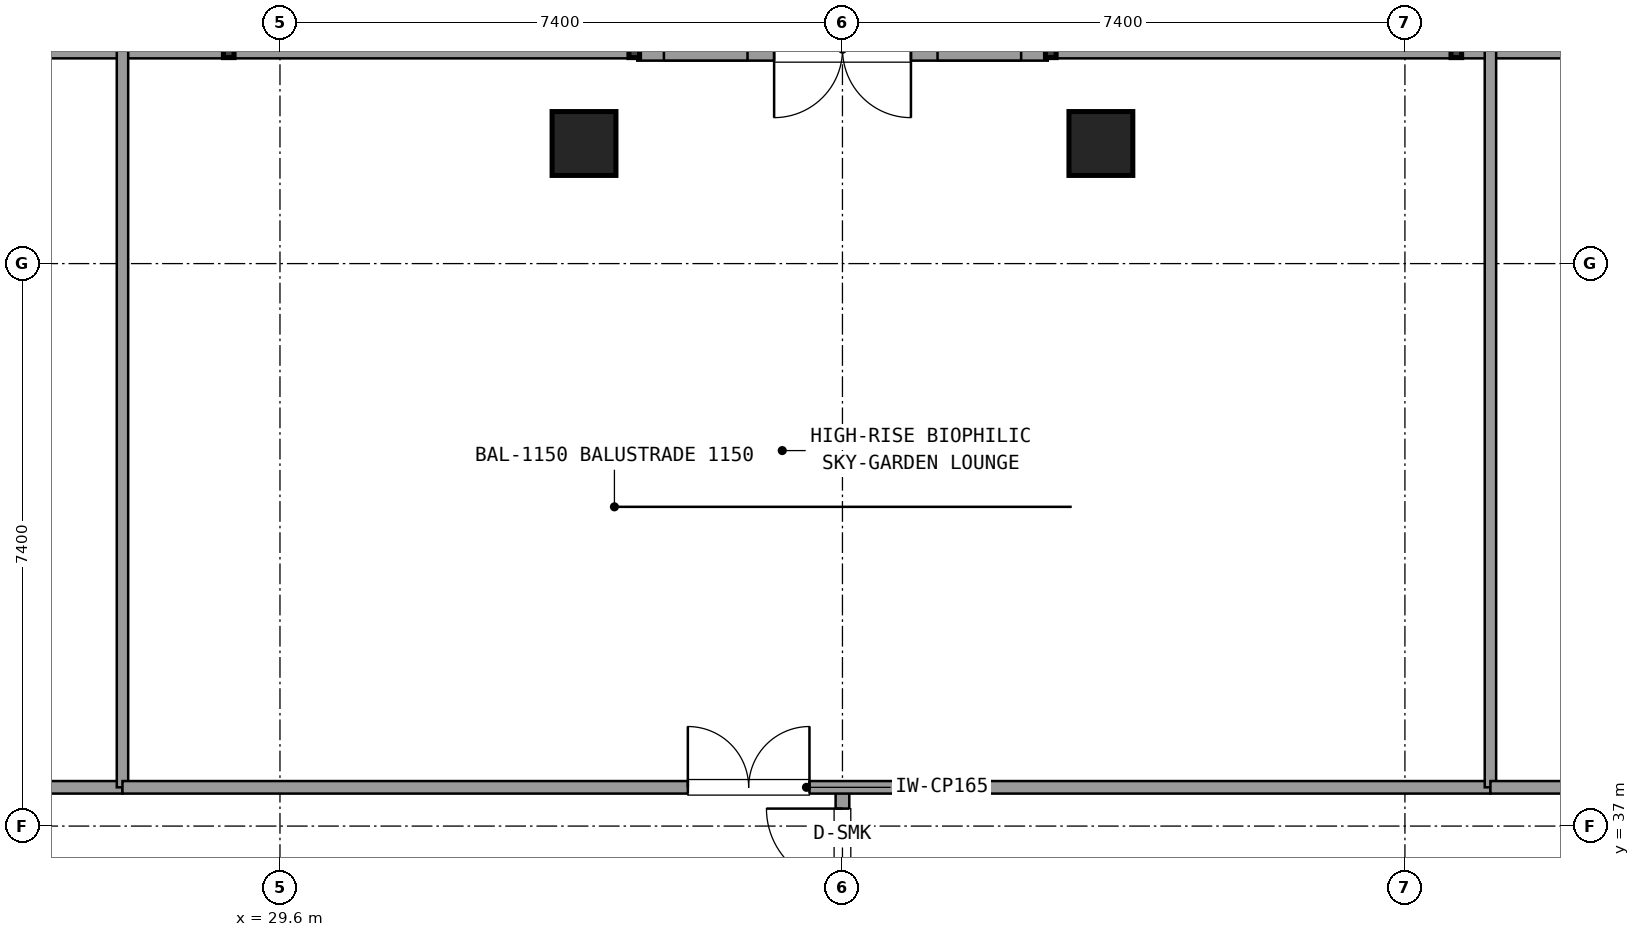
"""IFC4 building model, lengths in metres.
Left out: names, types, materials, properties, quantities, classifications, styles, units other than length and angle.
Written with IfcOpenShell. Run it as: python <this file> out.ifc"""

import sys

from ifc_helpers import new_model, si_unit, direction, frame, frame_2d, origin, origin_2d, place, context, subcontext, project, spatial, rectangle, extrude, element, fill, save


model = new_model("IFC4")
c1 = context("Model", 3, precision=1e-05, world=origin(), true_north=direction((0.0, 1.0)))
c2 = subcontext(c1, "Body", "Model", "MODEL_VIEW")
j1 = project(units=[si_unit("LENGTHUNIT", "METRE"), si_unit("PLANEANGLEUNIT", "RADIAN")], contexts=[c1])
p1 = place(None, origin())
s1 = spatial("IfcSite", under=j1, at=p1, CompositionType="ELEMENT")
p2 = place(p1, origin())
s2 = spatial("IfcBuilding", under=s1, at=p2, CompositionType="ELEMENT")
p3 = place(p2, frame((0.0, 0.0, 237.06)))
s3 = spatial("IfcBuildingStorey", under=s2, at=p3, CompositionType="ELEMENT", Elevation=237.06)
for number, where, z_axis, x_axis in (
    (1, (40.4, 45.98, 0.0), (0.0, 0.0, 1.0), (1.0, 0.0, 0.0)),
    (2, (33.6, 45.98, 0.0), (0.0, 0.0, 1.0), (1.0, 0.0, 0.0)),
):
    element("IfcColumn", number, at=place(p3, frame(where, z_axis=z_axis, x_axis=x_axis)), inside=s3, PredefinedType="COLUMN", context=c2, shape_type="SweptSolid", body=[
        extrude(rectangle(XDim=0.84, YDim=0.84, at=origin_2d()), origin(), (0.0, 0.0, 1.0), 5.76),
    ])
p4 = place(p3, frame((39.701, 47.22, 0.0), z_axis=(0.0, 0.0, 1.0), x_axis=(-1.0, 0.0, 0.0)))
e3 = element("IfcWall", 3, at=p4, inside=s3, PredefinedType="SOLIDWALL", context=c2, shape_type="SweptSolid", body=[
    extrude(rectangle(XDim=5.4, YDim=0.3, at=frame_2d((2.7, 0.0))), origin(), (0.0, 0.0, 1.0), 4.85),
])
p5 = place(p4, frame((1.8, 0.0, 0.0)))
e4 = element("IfcOpeningElement", 4, at=p5, cuts=e3, PredefinedType="OPENING", context=c2, shape_type="SweptSolid", body=[
    extrude(rectangle(XDim=1.8, YDim=2.25, at=frame_2d((0.9, 1.125))), frame((0.0, 0.16, 0.0), z_axis=(0.0, -1.0, 0.0), x_axis=(1.0, 0.0, 0.0)), (0.0, 0.0, 1.0), 0.32),
])
p6 = place(p4, frame((0.35, 0.0, 0.4)))
e5 = element("IfcOpeningElement", 5, at=p6, cuts=e3, PredefinedType="OPENING", context=c2, shape_type="SweptSolid", body=[
    extrude(rectangle(XDim=1.1, YDim=1.8, at=frame_2d((0.55, 0.9))), frame((0.0, 0.16, 0.0), z_axis=(0.0, -1.0, 0.0), x_axis=(1.0, 0.0, 0.0)), (0.0, 0.0, 1.0), 0.32),
])
p7 = place(p4, frame((3.95, 0.0, 0.4)))
e6 = element("IfcOpeningElement", 6, at=p7, cuts=e3, PredefinedType="OPENING", context=c2, shape_type="SweptSolid", body=[
    extrude(rectangle(XDim=1.1, YDim=1.8, at=frame_2d((0.55, 0.9))), frame((0.0, 0.16, 0.0), z_axis=(0.0, -1.0, 0.0), x_axis=(1.0, 0.0, 0.0)), (0.0, 0.0, 1.0), 0.32),
])
p8 = place(p3, frame((55.745, 47.22, 0.0), z_axis=(0.0, 0.0, 1.0), x_axis=(-1.0, 0.0, 0.0)))
e7 = element("IfcWall", 7, at=p8, inside=s3, PredefinedType="SOLIDWALL", context=c2, shape_type="SweptSolid", body=[
    extrude(rectangle(XDim=16.004, YDim=0.24, at=frame_2d((8.002, 0.0))), origin(), (0.0, 0.0, 1.0), 0.85),
])
p9 = place(p3, frame((34.261, 47.22, 0.0), z_axis=(0.0, 0.0, 1.0), x_axis=(-1.0, 0.0, 0.0)))
e8 = element("IfcWall", 8, at=p9, inside=s3, PredefinedType="SOLIDWALL", context=c2, shape_type="SweptSolid", body=[
    extrude(rectangle(XDim=16.006, YDim=0.24, at=frame_2d((8.003, 0.0))), origin(), (0.0, 0.0, 1.0), 0.85),
])
p10 = place(p3, frame((37.0, 34.95, 0.0), z_axis=(0.0, 0.0, 1.0), x_axis=(0.0, 1.0, 0.0)))
e9 = element("IfcWall", 9, at=p10, inside=s3, PredefinedType="PARTITIONING", context=c2, shape_type="SweptSolid", body=[
    extrude(rectangle(XDim=2.56, YDim=0.18, at=frame_2d((1.28, 0.0))), origin(), (0.0, 0.0, 1.0), 4.77),
])
p11 = place(p10, frame((0.28, 0.0, 0.0)))
e10 = element("IfcOpeningElement", 10, at=p11, cuts=e9, PredefinedType="OPENING", context=c2, shape_type="SweptSolid", body=[
    extrude(rectangle(XDim=2.0, YDim=2.2, at=frame_2d((1.0, 1.1))), frame((0.0, 0.1, 0.0), z_axis=(0.0, -1.0, 0.0), x_axis=(1.0, 0.0, 0.0)), (0.0, 0.0, 1.0), 0.2),
])
p12 = place(p3, frame((22.79, 37.51, 0.0), z_axis=(0.0, 0.0, 1.0), x_axis=(1.0, 0.0, 0.0)))
e11 = element("IfcWall", 11, at=p12, inside=s3, PredefinedType="PARTITIONING", context=c2, shape_type="SweptSolid", body=[
    extrude(rectangle(XDim=4.738, YDim=0.165, at=frame_2d((2.369, 0.0))), origin(), (0.0, 0.0, 1.0), 4.77),
])
p13 = place(p12, frame((1.569, 0.0, 0.0)))
e12 = element("IfcOpeningElement", 12, at=p13, cuts=e11, PredefinedType="OPENING", context=c2, shape_type="SweptSolid", body=[
    extrude(rectangle(XDim=1.6, YDim=2.2, at=frame_2d((0.8, 1.1))), frame((0.0, 0.093, 0.0), z_axis=(0.0, -1.0, 0.0), x_axis=(1.0, 0.0, 0.0)), (0.0, 0.0, 1.0), 0.185),
])
p14 = place(p3, frame((27.528, 37.51, 0.0), z_axis=(0.0, 0.0, 1.0), x_axis=(0.0, 1.0, 0.0)))
e13 = element("IfcWall", 13, at=p14, inside=s3, PredefinedType="PARTITIONING", context=c2, shape_type="SweptSolid", body=[
    extrude(rectangle(XDim=9.69, YDim=0.15, at=frame_2d((4.845, 0.0))), origin(), (0.0, 0.0, 1.0), 4.77),
])
p15 = place(p3, frame((27.528, 37.51, 0.0), z_axis=(0.0, 0.0, 1.0), x_axis=(1.0, 0.0, 0.0)))
e14 = element("IfcWall", 14, at=p15, inside=s3, PredefinedType="PARTITIONING", context=c2, shape_type="SweptSolid", body=[
    extrude(rectangle(XDim=17.997, YDim=0.165, at=frame_2d((8.999, 0.0))), origin(), (0.0, 0.0, 1.0), 4.77),
])
p16 = place(p15, frame((7.438, 0.0, 0.0)))
e15 = element("IfcOpeningElement", 15, at=p16, cuts=e14, PredefinedType="OPENING", context=c2, shape_type="SweptSolid", body=[
    extrude(rectangle(XDim=1.6, YDim=2.2, at=frame_2d((0.8, 1.1))), frame((0.0, 0.093, 0.0), z_axis=(0.0, -1.0, 0.0), x_axis=(1.0, 0.0, 0.0)), (0.0, 0.0, 1.0), 0.185),
])
p17 = place(p3, frame((45.525, 37.51, 0.0), z_axis=(0.0, 0.0, 1.0), x_axis=(0.0, 1.0, 0.0)))
e16 = element("IfcWall", 16, at=p17, inside=s3, PredefinedType="PARTITIONING", context=c2, shape_type="SweptSolid", body=[
    extrude(rectangle(XDim=9.69, YDim=0.15, at=frame_2d((4.845, 0.0))), origin(), (0.0, 0.0, 1.0), 4.77),
])
p18 = place(p3, frame((45.525, 37.51, 0.0), z_axis=(0.0, 0.0, 1.0), x_axis=(1.0, 0.0, 0.0)))
e17 = element("IfcWall", 17, at=p18, inside=s3, PredefinedType="PARTITIONING", context=c2, shape_type="SweptSolid", body=[
    extrude(rectangle(XDim=5.685, YDim=0.165, at=frame_2d((2.843, 0.0))), origin(), (0.0, 0.0, 1.0), 4.77),
])
p19 = place(p18, frame((2.043, 0.0, 0.0)))
e18 = element("IfcOpeningElement", 18, at=p19, cuts=e17, PredefinedType="OPENING", context=c2, shape_type="SweptSolid", body=[
    extrude(rectangle(XDim=1.6, YDim=2.2, at=frame_2d((0.8, 1.1))), frame((0.0, 0.093, 0.0), z_axis=(0.0, -1.0, 0.0), x_axis=(1.0, 0.0, 0.0)), (0.0, 0.0, 1.0), 0.185),
])
p20 = place(p11, origin())
e19 = element("IfcDoor", 19, at=p20, inside=s3, OperationType="DOUBLE_DOOR_SINGLE_SWING", PredefinedType="DOOR", context=c2, shape_type="SweptSolid", body=[
    extrude(rectangle(XDim=2.0, YDim=2.2, at=frame_2d((1.0, 1.1))), frame((0.0, 0.025, 0.0), z_axis=(0.0, -1.0, 0.0), x_axis=(1.0, 0.0, 0.0)), (0.0, 0.0, 1.0), 0.05),
])
fill(e10, e19)
p21 = place(p16, origin())
e20 = element("IfcDoor", 20, at=p21, inside=s3, OperationType="DOUBLE_DOOR_SINGLE_SWING", PredefinedType="DOOR", context=c2, shape_type="SweptSolid", body=[
    extrude(rectangle(XDim=1.6, YDim=2.2, at=frame_2d((0.8, 1.1))), frame((0.0, 0.025, 0.0), z_axis=(0.0, -1.0, 0.0), x_axis=(1.0, 0.0, 0.0)), (0.0, 0.0, 1.0), 0.05),
])
fill(e15, e20)
save(model, sys.argv[1])
